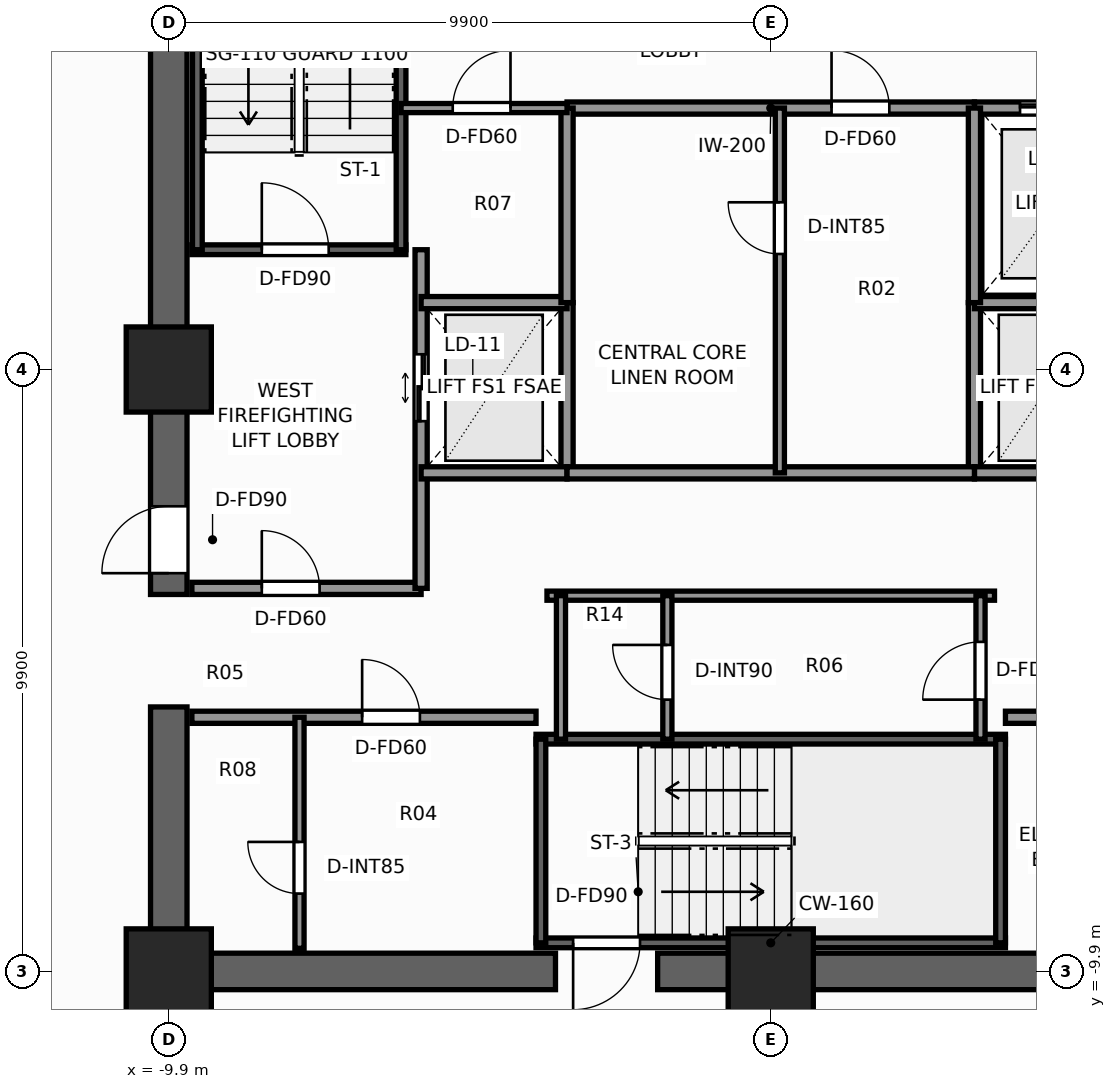
"""IFC4 building model, lengths in metres.
Left out: names, types, materials, properties, quantities, classifications, styles, units other than length and angle.
Written with IfcOpenShell. Run it as: python <this file> out.ifc"""

import sys

from ifc_helpers import new_model, si_unit, direction, frame, frame_2d, origin, origin_2d, place, context, subcontext, project, spatial, rectangle, extrude, element, fill, save


model = new_model("IFC4")
c1 = context("Model", 3, precision=1e-05, world=origin(), true_north=direction((0.0, 1.0)))
c2 = subcontext(c1, "Body", "Model", "MODEL_VIEW")
j1 = project(units=[si_unit("LENGTHUNIT", "METRE"), si_unit("PLANEANGLEUNIT", "RADIAN")], contexts=[c1])
p1 = place(None, origin())
s1 = spatial("IfcSite", under=j1, at=p1, CompositionType="ELEMENT")
p2 = place(p1, origin())
s2 = spatial("IfcBuilding", under=s1, at=p2, CompositionType="ELEMENT")
p3 = place(p2, frame((0.0, 0.0, 40.3)))
s3 = spatial("IfcBuildingStorey", under=s2, at=p3, CompositionType="ELEMENT", Elevation=40.3)
p4 = place(p3, frame((10.2, -9.9, 0.0), z_axis=(0.0, 0.0, 1.0), x_axis=(-1.0, 0.0, 0.0)))
e1 = element("IfcWall", 1, at=p4, inside=s3, PredefinedType="SHEAR", context=c2, shape_type="SweptSolid", body=[
    extrude(rectangle(XDim=12.06, YDim=0.6, at=frame_2d((6.03, 0.0))), origin(), (0.0, 0.0, 1.0), 3.3),
])
p5 = place(p3, frame((-3.54, -9.9, 0.0), z_axis=(0.0, 0.0, 1.0), x_axis=(-1.0, 0.0, 0.0)))
e2 = element("IfcWall", 2, at=p5, inside=s3, PredefinedType="SHEAR", context=c2, shape_type="SweptSolid", body=[
    extrude(rectangle(XDim=6.66, YDim=0.6, at=frame_2d((3.33, 0.0))), origin(), (0.0, 0.0, 1.0), 3.3),
])
p6 = place(p3, frame((-9.9, -9.6, 0.0), z_axis=(0.0, 0.0, 1.0), x_axis=(0.0, 1.0, 0.0)))
e3 = element("IfcWall", 3, at=p6, inside=s3, PredefinedType="SHEAR", context=c2, shape_type="SweptSolid", body=[
    extrude(rectangle(XDim=4.05, YDim=0.6, at=frame_2d((2.025, 0.0))), origin(), (0.0, 0.0, 1.0), 3.3),
])
p7 = place(p3, frame((-9.9, -3.7, 0.0), z_axis=(0.0, 0.0, 1.0), x_axis=(0.0, 1.0, 0.0)))
e4 = element("IfcWall", 4, at=p7, inside=s3, PredefinedType="SHEAR", context=c2, shape_type="SweptSolid", body=[
    extrude(rectangle(XDim=13.3, YDim=0.6, at=frame_2d((6.65, 0.0))), origin(), (0.0, 0.0, 1.0), 3.3),
])
p8 = place(p7, frame((0.35, 0.0, 0.0)))
e5 = element("IfcOpeningElement", 5, at=p8, cuts=e4, PredefinedType="OPENING", context=c2, shape_type="SweptSolid", body=[
    extrude(rectangle(XDim=1.1, YDim=2.2, at=frame_2d((0.55, 1.1))), frame((0.0, 0.31, 0.0), z_axis=(0.0, -1.0, 0.0), x_axis=(1.0, 0.0, 0.0)), (0.0, 0.0, 1.0), 0.62),
])
for number, where, z_axis, x_axis in (
    (6, (-9.9, -9.9, 0.0), (0.0, 0.0, 1.0), (1.0, 0.0, 0.0)),
    (7, (0.0, -9.9, 0.0), (0.0, 0.0, 1.0), (1.0, 0.0, 0.0)),
    (8, (-9.9, 0.0, 0.0), (0.0, 0.0, 1.0), (1.0, 0.0, 0.0)),
):
    element("IfcColumn", number, at=place(p3, frame(where, z_axis=z_axis, x_axis=x_axis)), inside=s3, PredefinedType="COLUMN", context=c2, shape_type="SweptSolid", body=[
        extrude(rectangle(XDim=1.4, YDim=1.4, at=origin_2d()), origin(), (0.0, 0.0, 1.0), 3.3),
    ])
p9 = place(p3, frame((-9.52, 1.97, 0.0), z_axis=(0.0, 0.0, 1.0), x_axis=(1.0, 0.0, 0.0)))
e9 = element("IfcWall", 9, at=p9, inside=s3, PredefinedType="SHEAR", context=c2, shape_type="SweptSolid", body=[
    extrude(rectangle(XDim=3.52, YDim=0.16, at=frame_2d((1.76, 0.0))), origin(), (0.0, 0.0, 1.0), 3.3),
])
p10 = place(p9, frame((1.15, 0.0, 0.0)))
e10 = element("IfcOpeningElement", 10, at=p10, cuts=e9, PredefinedType="OPENING", context=c2, shape_type="SweptSolid", body=[
    extrude(rectangle(XDim=1.1, YDim=2.2, at=frame_2d((0.55, 1.1))), frame((0.0, 0.09, 0.0), z_axis=(0.0, -1.0, 0.0), x_axis=(1.0, 0.0, 0.0)), (0.0, 0.0, 1.0), 0.18),
])
for number, where, z_axis, x_axis in (
    (11, (-9.43, 1.97, 0.0), (0.0, 0.0, 1.0), (0.0, 1.0, 0.0)),
    (12, (-6.08, 1.97, 0.0), (0.0, 0.0, 1.0), (0.0, 1.0, 0.0)),
):
    element("IfcWall", number, at=place(p3, frame(where, z_axis=z_axis, x_axis=x_axis)), inside=s3, PredefinedType="SHEAR", context=c2, shape_type="SweptSolid", body=[
        extrude(rectangle(XDim=7.56, YDim=0.16, at=frame_2d((3.78, 0.0))), origin(), (0.0, 0.0, 1.0), 3.3),
    ])
p11 = place(p3, frame((3.86, -9.43, 0.0), z_axis=(0.0, 0.0, 1.0), x_axis=(-1.0, 0.0, 0.0)))
e13 = element("IfcWall", 13, at=p11, inside=s3, PredefinedType="SHEAR", context=c2, shape_type="SweptSolid", body=[
    extrude(rectangle(XDim=7.72, YDim=0.16, at=frame_2d((3.86, 0.0))), origin(), (0.0, 0.0, 1.0), 3.3),
])
p12 = place(p11, frame((6.01, 0.0, 0.0)))
e14 = element("IfcOpeningElement", 14, at=p12, cuts=e13, PredefinedType="OPENING", context=c2, shape_type="SweptSolid", body=[
    extrude(rectangle(XDim=1.1, YDim=2.2, at=frame_2d((0.55, 1.1))), frame((0.0, 0.09, 0.0), z_axis=(0.0, -1.0, 0.0), x_axis=(1.0, 0.0, 0.0)), (0.0, 0.0, 1.0), 0.18),
])
p13 = place(p3, frame((-3.86, -6.08, 0.0), z_axis=(0.0, 0.0, 1.0), x_axis=(1.0, 0.0, 0.0)))
e15 = element("IfcWall", 15, at=p13, inside=s3, PredefinedType="SHEAR", context=c2, shape_type="SweptSolid", body=[
    extrude(rectangle(XDim=7.72, YDim=0.16, at=frame_2d((3.86, 0.0))), origin(), (0.0, 0.0, 1.0), 3.3),
])
for number, where, z_axis, x_axis in (
    (16, (-3.78, -9.43, 0.0), (0.0, 0.0, 1.0), (0.0, 1.0, 0.0)),
    (17, (3.78, -9.43, 0.0), (0.0, 0.0, 1.0), (0.0, 1.0, 0.0)),
):
    element("IfcWall", number, at=place(p3, frame(where, z_axis=z_axis, x_axis=x_axis)), inside=s3, PredefinedType="SHEAR", context=c2, shape_type="SweptSolid", body=[
        extrude(rectangle(XDim=3.35, YDim=0.16, at=frame_2d((1.675, 0.0))), origin(), (0.0, 0.0, 1.0), 3.3),
    ])
p14 = place(p3, frame((-9.52, -3.6, 0.0), z_axis=(0.0, 0.0, 1.0), x_axis=(1.0, 0.0, 0.0)))
e18 = element("IfcWall", 18, at=p14, inside=s3, PredefinedType="SOLIDWALL", context=c2, shape_type="SweptSolid", body=[
    extrude(rectangle(XDim=3.77, YDim=0.2, at=frame_2d((1.885, 0.0))), origin(), (0.0, 0.0, 1.0), 3.06),
])
p15 = place(p14, frame((1.15, 0.0, 0.0)))
e19 = element("IfcOpeningElement", 19, at=p15, cuts=e18, PredefinedType="OPENING", context=c2, shape_type="SweptSolid", body=[
    extrude(rectangle(XDim=0.95, YDim=2.06, at=frame_2d((0.475, 1.03))), frame((0.0, 0.11, 0.0), z_axis=(0.0, -1.0, 0.0), x_axis=(1.0, 0.0, 0.0)), (0.0, 0.0, 1.0), 0.22),
])
p16 = place(p3, frame((-5.75, -3.6, 0.0), z_axis=(0.0, 0.0, 1.0), x_axis=(0.0, 1.0, 0.0)))
e20 = element("IfcWall", 20, at=p16, inside=s3, PredefinedType="SOLIDWALL", context=c2, shape_type="SweptSolid", body=[
    extrude(rectangle(XDim=5.57, YDim=0.2, at=frame_2d((2.785, 0.0))), origin(), (0.0, 0.0, 1.0), 3.06),
])
p17 = place(p16, frame((2.75, 0.0, 0.0)))
e21 = element("IfcOpeningElement", 21, at=p17, cuts=e20, PredefinedType="OPENING", context=c2, shape_type="SweptSolid", body=[
    extrude(rectangle(XDim=1.1, YDim=2.2, at=frame_2d((0.55, 1.1))), frame((0.0, 0.11, 0.0), z_axis=(0.0, -1.0, 0.0), x_axis=(1.0, 0.0, 0.0)), (0.0, 0.0, 1.0), 0.22),
])
p18 = place(p3, frame((-3.35, -1.7, 0.0), z_axis=(0.0, 0.0, 1.0), x_axis=(0.0, 1.0, 0.0)))
e22 = element("IfcWall", 22, at=p18, inside=s3, PredefinedType="SOLIDWALL", context=c2, shape_type="SweptSolid", body=[
    extrude(rectangle(XDim=2.8, YDim=0.2, at=frame_2d((1.4, 0.0))), origin(), (0.0, 0.0, 1.0), 3.06),
])
for number, where, z_axis, x_axis in (
    (23, (-5.75, -1.7, 0.0), (0.0, 0.0, 1.0), (1.0, 0.0, 0.0)),
    (24, (-5.75, 1.1, 0.0), (0.0, 0.0, 1.0), (1.0, 0.0, 0.0)),
):
    element("IfcWall", number, at=place(p3, frame(where, z_axis=z_axis, x_axis=x_axis)), inside=s3, PredefinedType="SOLIDWALL", context=c2, shape_type="SweptSolid", body=[
        extrude(rectangle(XDim=2.4, YDim=0.2, at=frame_2d((1.2, 0.0))), origin(), (0.0, 0.0, 1.0), 3.06),
    ])
p19 = place(p3, frame((3.35, -1.7, 0.0), z_axis=(0.0, 0.0, 1.0), x_axis=(0.0, 1.0, 0.0)))
e25 = element("IfcWall", 25, at=p19, inside=s3, PredefinedType="SOLIDWALL", context=c2, shape_type="SweptSolid", body=[
    extrude(rectangle(XDim=2.8, YDim=0.2, at=frame_2d((1.4, 0.0))), origin(), (0.0, 0.0, 1.0), 3.06),
])
for number, where, z_axis, x_axis in (
    (26, (3.35, -1.7, 0.0), (0.0, 0.0, 1.0), (1.0, 0.0, 0.0)),
    (27, (3.35, 1.1, 0.0), (0.0, 0.0, 1.0), (1.0, 0.0, 0.0)),
):
    element("IfcWall", number, at=place(p3, frame(where, z_axis=z_axis, x_axis=x_axis)), inside=s3, PredefinedType="SOLIDWALL", context=c2, shape_type="SweptSolid", body=[
        extrude(rectangle(XDim=2.4, YDim=0.2, at=frame_2d((1.2, 0.0))), origin(), (0.0, 0.0, 1.0), 3.06),
    ])
p20 = place(p3, frame((3.35, 4.3, 0.0), z_axis=(0.0, 0.0, 1.0), x_axis=(1.0, 0.0, 0.0)))
e28 = element("IfcWall", 28, at=p20, inside=s3, PredefinedType="SOLIDWALL", context=c2, shape_type="SweptSolid", body=[
    extrude(rectangle(XDim=2.73, YDim=0.2, at=frame_2d((1.365, 0.0))), origin(), (0.0, 0.0, 1.0), 3.06),
])
p21 = place(p20, frame((0.75, 0.0, 0.0)))
e29 = element("IfcOpeningElement", 29, at=p21, cuts=e28, PredefinedType="OPENING", context=c2, shape_type="SweptSolid", body=[
    extrude(rectangle(XDim=1.2, YDim=2.25, at=frame_2d((0.6, 1.125))), frame((0.0, 0.11, 0.0), z_axis=(0.0, -1.0, 0.0), x_axis=(1.0, 0.0, 0.0)), (0.0, 0.0, 1.0), 0.22),
])
p22 = place(p3, frame((-9.52, -5.72, 0.0), z_axis=(0.0, 0.0, 1.0), x_axis=(1.0, 0.0, 0.0)))
e30 = element("IfcWall", 30, at=p22, inside=s3, PredefinedType="SOLIDWALL", context=c2, shape_type="SweptSolid", body=[
    extrude(rectangle(XDim=5.66, YDim=0.2, at=frame_2d((2.83, 0.0))), origin(), (0.0, 0.0, 1.0), 3.06),
])
p23 = place(p22, frame((2.8, 0.0, 0.0)))
e31 = element("IfcOpeningElement", 31, at=p23, cuts=e30, PredefinedType="OPENING", context=c2, shape_type="SweptSolid", body=[
    extrude(rectangle(XDim=0.95, YDim=2.06, at=frame_2d((0.475, 1.03))), frame((0.0, 0.11, 0.0), z_axis=(0.0, -1.0, 0.0), x_axis=(1.0, 0.0, 0.0)), (0.0, 0.0, 1.0), 0.22),
])
p24 = place(p3, frame((-7.75, -9.52, 0.0), z_axis=(0.0, 0.0, 1.0), x_axis=(0.0, 1.0, 0.0)))
e32 = element("IfcWall", 32, at=p24, inside=s3, PredefinedType="PARTITIONING", context=c2, shape_type="SweptSolid", body=[
    extrude(rectangle(XDim=3.8, YDim=0.15, at=frame_2d((1.9, 0.0))), origin(), (0.0, 0.0, 1.0), 3.06),
])
p25 = place(p24, frame((0.9, 0.0, 0.0)))
e33 = element("IfcOpeningElement", 33, at=p25, cuts=e32, PredefinedType="OPENING", context=c2, shape_type="SweptSolid", body=[
    extrude(rectangle(XDim=0.85, YDim=2.03, at=frame_2d((0.425, 1.015))), frame((0.0, 0.085, 0.0), z_axis=(0.0, -1.0, 0.0), x_axis=(1.0, 0.0, 0.0)), (0.0, 0.0, 1.0), 0.17),
])
p26 = place(p3, frame((3.86, -5.72, 0.0), z_axis=(0.0, 0.0, 1.0), x_axis=(1.0, 0.0, 0.0)))
e34 = element("IfcWall", 34, at=p26, inside=s3, PredefinedType="SOLIDWALL", context=c2, shape_type="SweptSolid", body=[
    extrude(rectangle(XDim=5.66, YDim=0.2, at=frame_2d((2.83, 0.0))), origin(), (0.0, 0.0, 1.0), 3.06),
])
p27 = place(p26, frame((1.2, 0.0, 0.0)))
e35 = element("IfcOpeningElement", 35, at=p27, cuts=e34, PredefinedType="OPENING", context=c2, shape_type="SweptSolid", body=[
    extrude(rectangle(XDim=0.95, YDim=2.06, at=frame_2d((0.475, 1.03))), frame((0.0, 0.11, 0.0), z_axis=(0.0, -1.0, 0.0), x_axis=(1.0, 0.0, 0.0)), (0.0, 0.0, 1.0), 0.22),
])
p28 = place(p3, frame((-3.35, 4.3, 0.0), z_axis=(0.0, 0.0, 1.0), x_axis=(1.0, 0.0, 0.0)))
e36 = element("IfcWall", 36, at=p28, inside=s3, PredefinedType="SOLIDWALL", context=c2, shape_type="SweptSolid", body=[
    extrude(rectangle(XDim=6.7, YDim=0.2, at=frame_2d((3.35, 0.0))), origin(), (0.0, 0.0, 1.0), 3.06),
])
p29 = place(p28, frame((4.35, 0.0, 0.0)))
e37 = element("IfcOpeningElement", 37, at=p29, cuts=e36, PredefinedType="OPENING", context=c2, shape_type="SweptSolid", body=[
    extrude(rectangle(XDim=0.95, YDim=2.06, at=frame_2d((0.475, 1.03))), frame((0.0, 0.11, 0.0), z_axis=(0.0, -1.0, 0.0), x_axis=(1.0, 0.0, 0.0)), (0.0, 0.0, 1.0), 0.22),
])
p30 = place(p3, frame((-3.35, -1.7, 0.0), z_axis=(0.0, 0.0, 1.0), x_axis=(1.0, 0.0, 0.0)))
e38 = element("IfcWall", 38, at=p30, inside=s3, PredefinedType="SOLIDWALL", context=c2, shape_type="SweptSolid", body=[
    extrude(rectangle(XDim=6.7, YDim=0.2, at=frame_2d((3.35, 0.0))), origin(), (0.0, 0.0, 1.0), 3.06),
])
for number, where, z_axis, x_axis in (
    (39, (-3.35, 1.1, 0.0), (0.0, 0.0, 1.0), (0.0, 1.0, 0.0)),
    (40, (3.35, 1.1, 0.0), (0.0, 0.0, 1.0), (0.0, 1.0, 0.0)),
):
    element("IfcWall", number, at=place(p3, frame(where, z_axis=z_axis, x_axis=x_axis)), inside=s3, PredefinedType="SOLIDWALL", context=c2, shape_type="SweptSolid", body=[
        extrude(rectangle(XDim=3.2, YDim=0.2, at=frame_2d((1.6, 0.0))), origin(), (0.0, 0.0, 1.0), 3.06),
    ])
p31 = place(p3, frame((0.15, -1.7, 0.0), z_axis=(0.0, 0.0, 1.0), x_axis=(0.0, 1.0, 0.0)))
e41 = element("IfcWall", 41, at=p31, inside=s3, PredefinedType="PARTITIONING", context=c2, shape_type="SweptSolid", body=[
    extrude(rectangle(XDim=6.0, YDim=0.15, at=frame_2d((3.0, 0.0))), origin(), (0.0, 0.0, 1.0), 3.06),
])
p32 = place(p31, frame((3.6, 0.0, 0.0)))
e42 = element("IfcOpeningElement", 42, at=p32, cuts=e41, PredefinedType="OPENING", context=c2, shape_type="SweptSolid", body=[
    extrude(rectangle(XDim=0.85, YDim=2.03, at=frame_2d((0.425, 1.015))), frame((0.0, 0.085, 0.0), z_axis=(0.0, -1.0, 0.0), x_axis=(1.0, 0.0, 0.0)), (0.0, 0.0, 1.0), 0.17),
])
p33 = place(p3, frame((-3.68, -3.72, 0.0), z_axis=(0.0, 0.0, 1.0), x_axis=(1.0, 0.0, 0.0)))
e43 = element("IfcWall", 43, at=p33, inside=s3, PredefinedType="PARTITIONING", context=c2, shape_type="SweptSolid", body=[
    extrude(rectangle(XDim=7.36, YDim=0.15, at=frame_2d((3.68, 0.0))), origin(), (0.0, 0.0, 1.0), 3.06),
])
p34 = place(p3, frame((3.45, -6.08, 0.0), z_axis=(0.0, 0.0, 1.0), x_axis=(0.0, 1.0, 0.0)))
e44 = element("IfcWall", 44, at=p34, inside=s3, PredefinedType="PARTITIONING", context=c2, shape_type="SweptSolid", body=[
    extrude(rectangle(XDim=2.36, YDim=0.15, at=frame_2d((1.18, 0.0))), origin(), (0.0, 0.0, 1.0), 3.06),
])
p35 = place(p34, frame((0.65, 0.0, 0.0)))
e45 = element("IfcOpeningElement", 45, at=p35, cuts=e44, PredefinedType="OPENING", context=c2, shape_type="SweptSolid", body=[
    extrude(rectangle(XDim=0.95, YDim=2.06, at=frame_2d((0.475, 1.03))), frame((0.0, 0.085, 0.0), z_axis=(0.0, -1.0, 0.0), x_axis=(1.0, 0.0, 0.0)), (0.0, 0.0, 1.0), 0.17),
])
p36 = place(p3, frame((-3.45, -6.08, 0.0), z_axis=(0.0, 0.0, 1.0), x_axis=(0.0, 1.0, 0.0)))
e46 = element("IfcWall", 46, at=p36, inside=s3, PredefinedType="PARTITIONING", context=c2, shape_type="SweptSolid", body=[
    extrude(rectangle(XDim=2.36, YDim=0.15, at=frame_2d((1.18, 0.0))), origin(), (0.0, 0.0, 1.0), 3.06),
])
p37 = place(p3, frame((-1.7, -6.08, 0.0), z_axis=(0.0, 0.0, 1.0), x_axis=(0.0, 1.0, 0.0)))
e47 = element("IfcWall", 47, at=p37, inside=s3, PredefinedType="PARTITIONING", context=c2, shape_type="SweptSolid", body=[
    extrude(rectangle(XDim=2.36, YDim=0.15, at=frame_2d((1.18, 0.0))), origin(), (0.0, 0.0, 1.0), 3.06),
])
p38 = place(p37, frame((0.65, 0.0, 0.0)))
e48 = element("IfcOpeningElement", 48, at=p38, cuts=e47, PredefinedType="OPENING", context=c2, shape_type="SweptSolid", body=[
    extrude(rectangle(XDim=0.9, YDim=2.06, at=frame_2d((0.45, 1.03))), frame((0.0, 0.085, 0.0), z_axis=(0.0, -1.0, 0.0), x_axis=(1.0, 0.0, 0.0)), (0.0, 0.0, 1.0), 0.17),
])
p39 = place(p3, frame((-6.08, 4.3, 0.0), z_axis=(0.0, 0.0, 1.0), x_axis=(1.0, 0.0, 0.0)))
e49 = element("IfcWall", 49, at=p39, inside=s3, PredefinedType="PARTITIONING", context=c2, shape_type="SweptSolid", body=[
    extrude(rectangle(XDim=2.73, YDim=0.15, at=frame_2d((1.365, 0.0))), origin(), (0.0, 0.0, 1.0), 3.06),
])
p40 = place(p39, frame((0.85, 0.0, 0.0)))
e50 = element("IfcOpeningElement", 50, at=p40, cuts=e49, PredefinedType="OPENING", context=c2, shape_type="SweptSolid", body=[
    extrude(rectangle(XDim=0.95, YDim=2.06, at=frame_2d((0.475, 1.03))), frame((0.0, 0.085, 0.0), z_axis=(0.0, -1.0, 0.0), x_axis=(1.0, 0.0, 0.0)), (0.0, 0.0, 1.0), 0.17),
])
p41 = place(p10, origin())
e51 = element("IfcDoor", 51, at=p41, inside=s3, OperationType="SINGLE_SWING_LEFT", PredefinedType="DOOR", context=c2, shape_type="SweptSolid", body=[
    extrude(rectangle(XDim=1.1, YDim=2.2, at=frame_2d((0.55, 1.1))), frame((0.0, 0.025, 0.0), z_axis=(0.0, -1.0, 0.0), x_axis=(1.0, 0.0, 0.0)), (0.0, 0.0, 1.0), 0.05),
])
fill(e10, e51)
p42 = place(p12, origin())
e52 = element("IfcDoor", 52, at=p42, inside=s3, OperationType="SINGLE_SWING_RIGHT", PredefinedType="DOOR", context=c2, shape_type="SweptSolid", body=[
    extrude(rectangle(XDim=1.1, YDim=2.2, at=frame_2d((0.55, 1.1))), frame((0.0, 0.025, 0.0), z_axis=(0.0, -1.0, 0.0), x_axis=(1.0, 0.0, 0.0)), (0.0, 0.0, 1.0), 0.05),
])
fill(e14, e52)
p43 = place(p8, origin())
e53 = element("IfcDoor", 53, at=p43, inside=s3, OperationType="SINGLE_SWING_LEFT", PredefinedType="DOOR", context=c2, shape_type="SweptSolid", body=[
    extrude(rectangle(XDim=1.1, YDim=2.2, at=frame_2d((0.55, 1.1))), frame((0.0, 0.025, 0.0), z_axis=(0.0, -1.0, 0.0), x_axis=(1.0, 0.0, 0.0)), (0.0, 0.0, 1.0), 0.05),
])
fill(e5, e53)
p44 = place(p17, origin())
e54 = element("IfcDoor", 54, at=p44, inside=s3, OperationType="DOUBLE_DOOR_SLIDING", PredefinedType="DOOR", context=c2, shape_type="SweptSolid", body=[
    extrude(rectangle(XDim=1.1, YDim=2.2, at=frame_2d((0.55, 1.1))), frame((0.0, 0.025, 0.0), z_axis=(0.0, -1.0, 0.0), x_axis=(1.0, 0.0, 0.0)), (0.0, 0.0, 1.0), 0.05),
])
fill(e21, e54)
p45 = place(p21, origin())
e55 = element("IfcDoor", 55, at=p45, inside=s3, OperationType="DOUBLE_DOOR_SLIDING", PredefinedType="DOOR", context=c2, shape_type="SweptSolid", body=[
    extrude(rectangle(XDim=1.2, YDim=2.25, at=frame_2d((0.6, 1.125))), frame((0.0, 0.025, 0.0), z_axis=(0.0, -1.0, 0.0), x_axis=(1.0, 0.0, 0.0)), (0.0, 0.0, 1.0), 0.05),
])
fill(e29, e55)
p46 = place(p23, origin())
e56 = element("IfcDoor", 56, at=p46, inside=s3, OperationType="SINGLE_SWING_LEFT", PredefinedType="DOOR", context=c2, shape_type="SweptSolid", body=[
    extrude(rectangle(XDim=0.95, YDim=2.06, at=frame_2d((0.475, 1.03))), frame((0.0, 0.025, 0.0), z_axis=(0.0, -1.0, 0.0), x_axis=(1.0, 0.0, 0.0)), (0.0, 0.0, 1.0), 0.05),
])
fill(e31, e56)
p47 = place(p25, origin())
e57 = element("IfcDoor", 57, at=p47, inside=s3, OperationType="SINGLE_SWING_RIGHT", PredefinedType="DOOR", context=c2, shape_type="SweptSolid", body=[
    extrude(rectangle(XDim=0.85, YDim=2.03, at=frame_2d((0.425, 1.015))), frame((0.0, 0.025, 0.0), z_axis=(0.0, -1.0, 0.0), x_axis=(1.0, 0.0, 0.0)), (0.0, 0.0, 1.0), 0.05),
])
fill(e33, e57)
p48 = place(p15, origin())
e58 = element("IfcDoor", 58, at=p48, inside=s3, OperationType="SINGLE_SWING_LEFT", PredefinedType="DOOR", context=c2, shape_type="SweptSolid", body=[
    extrude(rectangle(XDim=0.95, YDim=2.06, at=frame_2d((0.475, 1.03))), frame((0.0, 0.025, 0.0), z_axis=(0.0, -1.0, 0.0), x_axis=(1.0, 0.0, 0.0)), (0.0, 0.0, 1.0), 0.05),
])
fill(e19, e58)
p49 = place(p29, origin())
e59 = element("IfcDoor", 59, at=p49, inside=s3, OperationType="SINGLE_SWING_LEFT", PredefinedType="DOOR", context=c2, shape_type="SweptSolid", body=[
    extrude(rectangle(XDim=0.95, YDim=2.06, at=frame_2d((0.475, 1.03))), frame((0.0, 0.025, 0.0), z_axis=(0.0, -1.0, 0.0), x_axis=(1.0, 0.0, 0.0)), (0.0, 0.0, 1.0), 0.05),
])
fill(e37, e59)
p50 = place(p32, origin())
e60 = element("IfcDoor", 60, at=p50, inside=s3, OperationType="SINGLE_SWING_RIGHT", PredefinedType="DOOR", context=c2, shape_type="SweptSolid", body=[
    extrude(rectangle(XDim=0.85, YDim=2.03, at=frame_2d((0.425, 1.015))), frame((0.0, 0.025, 0.0), z_axis=(0.0, -1.0, 0.0), x_axis=(1.0, 0.0, 0.0)), (0.0, 0.0, 1.0), 0.05),
])
fill(e42, e60)
p51 = place(p35, origin())
e61 = element("IfcDoor", 61, at=p51, inside=s3, OperationType="SINGLE_SWING_LEFT", PredefinedType="DOOR", context=c2, shape_type="SweptSolid", body=[
    extrude(rectangle(XDim=0.95, YDim=2.06, at=frame_2d((0.475, 1.03))), frame((0.0, 0.025, 0.0), z_axis=(0.0, -1.0, 0.0), x_axis=(1.0, 0.0, 0.0)), (0.0, 0.0, 1.0), 0.05),
])
fill(e45, e61)
p52 = place(p38, origin())
e62 = element("IfcDoor", 62, at=p52, inside=s3, OperationType="SINGLE_SWING_RIGHT", PredefinedType="DOOR", context=c2, shape_type="SweptSolid", body=[
    extrude(rectangle(XDim=0.9, YDim=2.06, at=frame_2d((0.45, 1.03))), frame((0.0, 0.025, 0.0), z_axis=(0.0, -1.0, 0.0), x_axis=(1.0, 0.0, 0.0)), (0.0, 0.0, 1.0), 0.05),
])
fill(e48, e62)
p53 = place(p40, origin())
e63 = element("IfcDoor", 63, at=p53, inside=s3, OperationType="SINGLE_SWING_RIGHT", PredefinedType="DOOR", context=c2, shape_type="SweptSolid", body=[
    extrude(rectangle(XDim=0.95, YDim=2.06, at=frame_2d((0.475, 1.03))), frame((0.0, 0.025, 0.0), z_axis=(0.0, -1.0, 0.0), x_axis=(1.0, 0.0, 0.0)), (0.0, 0.0, 1.0), 0.05),
])
fill(e50, e63)
save(model, sys.argv[1])
